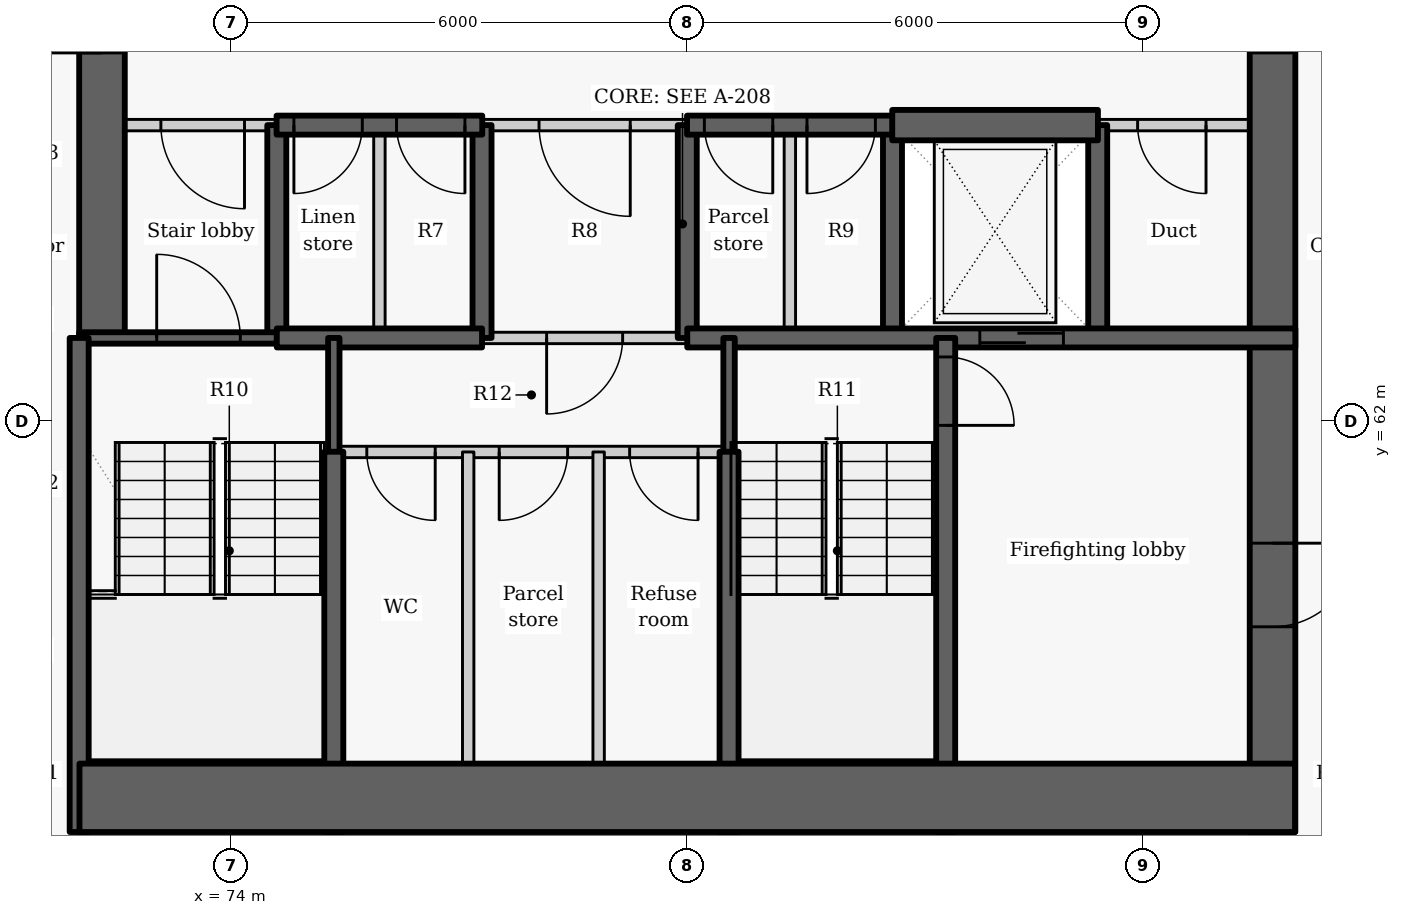
"""IFC4 building model, lengths in metres.
Left out: names, types, materials, properties, quantities, classifications, styles, units other than length and angle.
Written with IfcOpenShell. Run it as: python <this file> out.ifc"""

import sys

from ifc_helpers import new_model, si_unit, direction, frame, frame_2d, origin, place, context, subcontext, project, spatial, rectangle, extrude, element, fill, save


model = new_model("IFC4")
c1 = context("Model", 3, precision=1e-05, world=origin(), true_north=direction((0.0, 1.0)))
c2 = subcontext(c1, "Body", "Model", "MODEL_VIEW")
j1 = project(units=[si_unit("LENGTHUNIT", "METRE"), si_unit("PLANEANGLEUNIT", "RADIAN")], contexts=[c1])
p1 = place(None, origin())
s1 = spatial("IfcSite", under=j1, at=p1, CompositionType="ELEMENT")
p2 = place(p1, origin())
s2 = spatial("IfcBuilding", under=s1, at=p2, CompositionType="ELEMENT")
p3 = place(p2, frame((0.0, 0.0, 31.5)))
s3 = spatial("IfcBuildingStorey", under=s2, at=p3, CompositionType="ELEMENT", Elevation=31.5)
p4 = place(p3, frame((74.6, 63.1, -0.275), z_axis=(0.0, 0.0, 1.0), x_axis=(0.0, 1.0, 0.0)))
e1 = element("IfcWall", 1, at=p4, inside=s3, PredefinedType="SHEAR", context=c2, shape_type="SweptSolid", body=[
    extrude(rectangle(XDim=2.8, YDim=0.25, at=frame_2d((1.4, 0.0))), origin(), (0.0, 0.0, 1.0), 3.3),
])
p5 = place(p3, frame((72.3, 63.1, -0.275), z_axis=(0.0, 0.0, 1.0), x_axis=(0.0, 1.0, 0.0)))
e2 = element("IfcWall", 2, at=p5, inside=s3, PredefinedType="SHEAR", context=c2, shape_type="SweptSolid", body=[
    extrude(rectangle(XDim=9.1, YDim=0.6, at=frame_2d((4.55, 0.0))), origin(), (0.0, 0.0, 1.0), 3.3),
])
p6 = place(p5, frame((3.75, 0.0, 0.275)))
e3 = element("IfcOpeningElement", 3, at=p6, cuts=e2, PredefinedType="OPENING", context=c2, shape_type="SweptSolid", body=[
    extrude(rectangle(XDim=1.5, YDim=2.1, at=frame_2d((0.75, 1.05))), frame((0.0, 0.31, 0.0), z_axis=(0.0, -1.0, 0.0), x_axis=(1.0, 0.0, 0.0)), (0.0, 0.0, 1.0), 0.62),
])
for number, where, z_axis, x_axis in (
    (4, (77.3, 63.1, -0.275), (0.0, 0.0, 1.0), (0.0, 1.0, 0.0)),
    (5, (80.0, 63.1, -0.275), (0.0, 0.0, 1.0), (0.0, 1.0, 0.0)),
    (6, (82.7, 63.1, -0.275), (0.0, 0.0, 1.0), (0.0, 1.0, 0.0)),
    (7, (85.4, 63.1, -0.275), (0.0, 0.0, 1.0), (0.0, 1.0, 0.0)),
):
    element("IfcWall", number, at=place(p3, frame(where, z_axis=z_axis, x_axis=x_axis)), inside=s3, PredefinedType="SHEAR", context=c2, shape_type="SweptSolid", body=[
        extrude(rectangle(XDim=2.8, YDim=0.25, at=frame_2d((1.4, 0.0))), origin(), (0.0, 0.0, 1.0), 3.3),
    ])
p7 = place(p3, frame((87.7, 72.2, -0.275), z_axis=(0.0, 0.0, 1.0), x_axis=(0.0, -1.0, 0.0)))
e8 = element("IfcWall", 8, at=p7, inside=s3, PredefinedType="SHEAR", context=c2, shape_type="SweptSolid", body=[
    extrude(rectangle(XDim=15.6, YDim=0.6, at=frame_2d((7.8, 0.0))), origin(), (0.0, 0.0, 1.0), 3.3),
])
p8 = place(p7, frame((3.85, 0.0, 0.275)))
e9 = element("IfcOpeningElement", 9, at=p8, cuts=e8, PredefinedType="OPENING", context=c2, shape_type="SweptSolid", body=[
    extrude(rectangle(XDim=1.5, YDim=2.1, at=frame_2d((0.75, 1.05))), frame((0.0, 0.31, 0.0), z_axis=(0.0, -1.0, 0.0), x_axis=(1.0, 0.0, 0.0)), (0.0, 0.0, 1.0), 0.62),
])
p9 = place(p7, frame((11.8, 0.0, 0.275)))
e10 = element("IfcOpeningElement", 10, at=p9, cuts=e8, PredefinedType="OPENING", context=c2, shape_type="SweptSolid", body=[
    extrude(rectangle(XDim=1.1, YDim=2.1, at=frame_2d((0.55, 1.05))), frame((0.0, 0.31, 0.0), z_axis=(0.0, -1.0, 0.0), x_axis=(1.0, 0.0, 0.0)), (0.0, 0.0, 1.0), 0.62),
])
p10 = place(p3, frame((74.603, 65.9, 0.0), z_axis=(0.0, 0.0, 1.0), x_axis=(-1.0, 0.0, 0.0)))
e11 = element("IfcWall", 11, at=p10, inside=s3, PredefinedType="PARTITIONING", context=c2, shape_type="SweptSolid", body=[
    extrude(rectangle(XDim=2.603, YDim=0.15, at=frame_2d((1.302, 0.0))), origin(), (0.0, 0.0, 1.0), 3.025),
])
p11 = place(p10, frame((0.428, 0.0, 0.0)))
e12 = element("IfcOpeningElement", 12, at=p11, cuts=e11, PredefinedType="OPENING", context=c2, shape_type="SweptSolid", body=[
    extrude(rectangle(XDim=1.1, YDim=2.1, at=frame_2d((0.55, 1.05))), frame((0.0, 0.085, 0.0), z_axis=(0.0, -1.0, 0.0), x_axis=(1.0, 0.0, 0.0)), (0.0, 0.0, 1.0), 0.17),
])
p12 = place(p3, frame((80.003, 65.9, 0.0), z_axis=(0.0, 0.0, 1.0), x_axis=(-1.0, 0.0, 0.0)))
e13 = element("IfcWall", 13, at=p12, inside=s3, PredefinedType="PARTITIONING", context=c2, shape_type="SweptSolid", body=[
    extrude(rectangle(XDim=2.706, YDim=0.15, at=frame_2d((1.353, 0.0))), origin(), (0.0, 0.0, 1.0), 3.025),
])
p13 = place(p12, frame((0.753, 0.0, 0.0)))
e14 = element("IfcOpeningElement", 14, at=p13, cuts=e13, PredefinedType="OPENING", context=c2, shape_type="SweptSolid", body=[
    extrude(rectangle(XDim=1.2, YDim=2.1, at=frame_2d((0.6, 1.05))), frame((0.0, 0.085, 0.0), z_axis=(0.0, -1.0, 0.0), x_axis=(1.0, 0.0, 0.0)), (0.0, 0.0, 1.0), 0.17),
])
p14 = place(p3, frame((88.0, 65.9, 0.0), z_axis=(0.0, 0.0, 1.0), x_axis=(-1.0, 0.0, 0.0)))
e15 = element("IfcWall", 15, at=p14, inside=s3, PredefinedType="PARTITIONING", context=c2, shape_type="SweptSolid", body=[
    extrude(rectangle(XDim=2.603, YDim=0.15, at=frame_2d((1.302, 0.0))), origin(), (0.0, 0.0, 1.0), 3.025),
])
p15 = place(p14, frame((1.175, 0.0, 0.0)))
e16 = element("IfcOpeningElement", 16, at=p15, cuts=e15, PredefinedType="OPENING", context=c2, shape_type="SweptSolid", body=[
    extrude(rectangle(XDim=0.9, YDim=2.1, at=frame_2d((0.45, 1.05))), frame((0.0, 0.085, 0.0), z_axis=(0.0, -1.0, 0.0), x_axis=(1.0, 0.0, 0.0)), (0.0, 0.0, 1.0), 0.17),
])
p16 = place(p3, frame((77.303, 65.9, -0.275), z_axis=(0.0, 0.0, 1.0), x_axis=(-1.0, 0.0, 0.0)))
e17 = element("IfcWall", 17, at=p16, inside=s3, PredefinedType="SHEAR", context=c2, shape_type="SweptSolid", body=[
    extrude(rectangle(XDim=2.706, YDim=0.25, at=frame_2d((1.353, 0.0))), origin(), (0.0, 0.0, 1.0), 3.3),
])
p17 = place(p16, frame((1.578, 0.0, 0.275)))
e18 = element("IfcOpeningElement", 18, at=p17, cuts=e17, PredefinedType="OPENING", context=c2, shape_type="SweptSolid", body=[
    extrude(rectangle(XDim=0.9, YDim=2.1, at=frame_2d((0.45, 1.05))), frame((0.0, 0.135, 0.0), z_axis=(0.0, -1.0, 0.0), x_axis=(1.0, 0.0, 0.0)), (0.0, 0.0, 1.0), 0.27),
])
p18 = place(p16, frame((0.228, 0.0, 0.275)))
e19 = element("IfcOpeningElement", 19, at=p18, cuts=e17, PredefinedType="OPENING", context=c2, shape_type="SweptSolid", body=[
    extrude(rectangle(XDim=0.9, YDim=2.1, at=frame_2d((0.45, 1.05))), frame((0.0, 0.135, 0.0), z_axis=(0.0, -1.0, 0.0), x_axis=(1.0, 0.0, 0.0)), (0.0, 0.0, 1.0), 0.27),
])
p19 = place(p3, frame((82.703, 65.9, -0.275), z_axis=(0.0, 0.0, 1.0), x_axis=(-1.0, 0.0, 0.0)))
e20 = element("IfcWall", 20, at=p19, inside=s3, PredefinedType="SHEAR", context=c2, shape_type="SweptSolid", body=[
    extrude(rectangle(XDim=2.706, YDim=0.25, at=frame_2d((1.353, 0.0))), origin(), (0.0, 0.0, 1.0), 3.3),
])
p20 = place(p19, frame((1.578, 0.0, 0.275)))
e21 = element("IfcOpeningElement", 21, at=p20, cuts=e20, PredefinedType="OPENING", context=c2, shape_type="SweptSolid", body=[
    extrude(rectangle(XDim=0.9, YDim=2.1, at=frame_2d((0.45, 1.05))), frame((0.0, 0.135, 0.0), z_axis=(0.0, -1.0, 0.0), x_axis=(1.0, 0.0, 0.0)), (0.0, 0.0, 1.0), 0.27),
])
p21 = place(p19, frame((0.228, 0.0, 0.275)))
e22 = element("IfcOpeningElement", 22, at=p21, cuts=e20, PredefinedType="OPENING", context=c2, shape_type="SweptSolid", body=[
    extrude(rectangle(XDim=0.9, YDim=2.1, at=frame_2d((0.45, 1.05))), frame((0.0, 0.135, 0.0), z_axis=(0.0, -1.0, 0.0), x_axis=(1.0, 0.0, 0.0)), (0.0, 0.0, 1.0), 0.27),
])
p22 = place(p3, frame((82.697, 65.9, -0.275), z_axis=(0.0, 0.0, 1.0), x_axis=(1.0, 0.0, 0.0)))
e23 = element("IfcWall", 23, at=p22, inside=s3, PredefinedType="SHEAR", context=c2, shape_type="SweptSolid", body=[
    extrude(rectangle(XDim=2.706, YDim=0.4, at=frame_2d((1.353, 0.0))), origin(), (0.0, 0.0, 1.0), 3.3),
])
p23 = place(p3, frame((72.0, 63.1, -0.275), z_axis=(0.0, 0.0, 1.0), x_axis=(1.0, 0.0, 0.0)))
e24 = element("IfcWall", 24, at=p23, inside=s3, PredefinedType="SHEAR", context=c2, shape_type="SweptSolid", body=[
    extrude(rectangle(XDim=2.6, YDim=0.15, at=frame_2d((1.3, 0.0))), origin(), (0.0, 0.0, 1.0), 3.3),
])
p24 = place(p23, frame((1.02, 0.0, 0.275)))
e25 = element("IfcOpeningElement", 25, at=p24, cuts=e24, PredefinedType="OPENING", context=c2, shape_type="SweptSolid", body=[
    extrude(rectangle(XDim=1.1, YDim=2.1, at=frame_2d((0.55, 1.05))), frame((0.0, 0.085, 0.0), z_axis=(0.0, -1.0, 0.0), x_axis=(1.0, 0.0, 0.0)), (0.0, 0.0, 1.0), 0.17),
])
p25 = place(p3, frame((75.95, 63.1, 0.0), z_axis=(0.0, 0.0, 1.0), x_axis=(0.0, 1.0, 0.0)))
e26 = element("IfcWall", 26, at=p25, inside=s3, PredefinedType="PARTITIONING", context=c2, shape_type="SweptSolid", body=[
    extrude(rectangle(XDim=2.8, YDim=0.15, at=frame_2d((1.4, 0.0))), origin(), (0.0, 0.0, 1.0), 3.025),
])
p26 = place(p3, frame((74.6, 63.1, -0.275), z_axis=(0.0, 0.0, 1.0), x_axis=(1.0, 0.0, 0.0)))
e27 = element("IfcWall", 27, at=p26, inside=s3, PredefinedType="SHEAR", context=c2, shape_type="SweptSolid", body=[
    extrude(rectangle(XDim=2.7, YDim=0.25, at=frame_2d((1.35, 0.0))), origin(), (0.0, 0.0, 1.0), 3.3),
])
p27 = place(p3, frame((80.0, 63.1, -0.275), z_axis=(0.0, 0.0, 1.0), x_axis=(1.0, 0.0, 0.0)))
e28 = element("IfcWall", 28, at=p27, inside=s3, PredefinedType="SHEAR", context=c2, shape_type="SweptSolid", body=[
    extrude(rectangle(XDim=8.0, YDim=0.25, at=frame_2d((4.0, 0.0))), origin(), (0.0, 0.0, 1.0), 3.3),
])
p28 = place(p27, frame((3.849, 0.0, 0.275)))
e29 = element("IfcOpeningElement", 29, at=p28, cuts=e28, PredefinedType="OPENING", context=c2, shape_type="SweptSolid", body=[
    extrude(rectangle(XDim=1.1, YDim=2.1, at=frame_2d((0.55, 1.05))), frame((0.0, 0.135, 0.0), z_axis=(0.0, -1.0, 0.0), x_axis=(1.0, 0.0, 0.0)), (0.0, 0.0, 1.0), 0.27),
])
p29 = place(p3, frame((80.0, 63.1, 0.0), z_axis=(0.0, 0.0, 1.0), x_axis=(-1.0, 0.0, 0.0)))
e30 = element("IfcWall", 30, at=p29, inside=s3, PredefinedType="PARTITIONING", context=c2, shape_type="SweptSolid", body=[
    extrude(rectangle(XDim=2.7, YDim=0.15, at=frame_2d((1.35, 0.0))), origin(), (0.0, 0.0, 1.0), 3.025),
])
p30 = place(p29, frame((0.85, 0.0, 0.0)))
e31 = element("IfcOpeningElement", 31, at=p30, cuts=e30, PredefinedType="OPENING", context=c2, shape_type="SweptSolid", body=[
    extrude(rectangle(XDim=1.0, YDim=2.1, at=frame_2d((0.5, 1.05))), frame((0.0, 0.085, 0.0), z_axis=(0.0, -1.0, 0.0), x_axis=(1.0, 0.0, 0.0)), (0.0, 0.0, 1.0), 0.17),
])
p31 = place(p3, frame((81.35, 63.1, 0.0), z_axis=(0.0, 0.0, 1.0), x_axis=(0.0, 1.0, 0.0)))
e32 = element("IfcWall", 32, at=p31, inside=s3, PredefinedType="PARTITIONING", context=c2, shape_type="SweptSolid", body=[
    extrude(rectangle(XDim=2.8, YDim=0.15, at=frame_2d((1.4, 0.0))), origin(), (0.0, 0.0, 1.0), 3.025),
])
p32 = place(p3, frame((75.35, 61.597, -0.275), z_axis=(0.0, 0.0, 1.0), x_axis=(0.0, 1.0, 0.0)))
e33 = element("IfcWall", 33, at=p32, inside=s3, PredefinedType="SHEAR", context=c2, shape_type="SweptSolid", body=[
    extrude(rectangle(XDim=1.503, YDim=0.15, at=frame_2d((0.751, 0.0))), origin(), (0.0, 0.0, 1.0), 3.3),
])
p33 = place(p3, frame((75.35, 56.6, -0.275), z_axis=(0.0, 0.0, 1.0), x_axis=(0.0, 1.0, 0.0)))
e34 = element("IfcWall", 34, at=p33, inside=s3, PredefinedType="SHEAR", context=c2, shape_type="SweptSolid", body=[
    extrude(rectangle(XDim=5.003, YDim=0.25, at=frame_2d((2.501, 0.0))), origin(), (0.0, 0.0, 1.0), 3.3),
])
p34 = place(p3, frame((72.0, 56.6, -0.275), z_axis=(0.0, 0.0, 1.0), x_axis=(0.0, 1.0, 0.0)))
e35 = element("IfcWall", 35, at=p34, inside=s3, PredefinedType="SHEAR", context=c2, shape_type="SweptSolid", body=[
    extrude(rectangle(XDim=6.5, YDim=0.25, at=frame_2d((3.25, 0.0))), origin(), (0.0, 0.0, 1.0), 3.3),
])
p35 = place(p3, frame((83.4, 63.1, -0.275), z_axis=(0.0, 0.0, 1.0), x_axis=(0.0, -1.0, 0.0)))
e36 = element("IfcWall", 36, at=p35, inside=s3, PredefinedType="SHEAR", context=c2, shape_type="SweptSolid", body=[
    extrude(rectangle(XDim=6.5, YDim=0.25, at=frame_2d((3.25, 0.0))), origin(), (0.0, 0.0, 1.0), 3.3),
])
p36 = place(p35, frame((0.25, 0.0, 0.275)))
e37 = element("IfcOpeningElement", 37, at=p36, cuts=e36, PredefinedType="OPENING", context=c2, shape_type="SweptSolid", body=[
    extrude(rectangle(XDim=0.9, YDim=2.1, at=frame_2d((0.45, 1.05))), frame((0.0, 0.135, 0.0), z_axis=(0.0, -1.0, 0.0), x_axis=(1.0, 0.0, 0.0)), (0.0, 0.0, 1.0), 0.27),
])
p37 = place(p3, frame((80.55, 61.597, -0.275), z_axis=(0.0, 0.0, 1.0), x_axis=(0.0, 1.0, 0.0)))
e38 = element("IfcWall", 38, at=p37, inside=s3, PredefinedType="SHEAR", context=c2, shape_type="SweptSolid", body=[
    extrude(rectangle(XDim=1.503, YDim=0.15, at=frame_2d((0.751, 0.0))), origin(), (0.0, 0.0, 1.0), 3.3),
])
p38 = place(p3, frame((80.55, 56.6, -0.275), z_axis=(0.0, 0.0, 1.0), x_axis=(0.0, 1.0, 0.0)))
e39 = element("IfcWall", 39, at=p38, inside=s3, PredefinedType="SHEAR", context=c2, shape_type="SweptSolid", body=[
    extrude(rectangle(XDim=5.003, YDim=0.25, at=frame_2d((2.501, 0.0))), origin(), (0.0, 0.0, 1.0), 3.3),
])
p39 = place(p3, frame((80.55, 61.6, 0.0), z_axis=(0.0, 0.0, 1.0), x_axis=(-1.0, 0.0, 0.0)))
e40 = element("IfcWall", 40, at=p39, inside=s3, PredefinedType="PARTITIONING", context=c2, shape_type="SweptSolid", body=[
    extrude(rectangle(XDim=5.2, YDim=0.15, at=frame_2d((2.6, 0.0))), origin(), (0.0, 0.0, 1.0), 3.025),
])
p40 = place(p39, frame((3.866, 0.0, 0.0)))
e41 = element("IfcOpeningElement", 41, at=p40, cuts=e40, PredefinedType="OPENING", context=c2, shape_type="SweptSolid", body=[
    extrude(rectangle(XDim=0.9, YDim=2.1, at=frame_2d((0.45, 1.05))), frame((0.0, 0.085, 0.0), z_axis=(0.0, -1.0, 0.0), x_axis=(1.0, 0.0, 0.0)), (0.0, 0.0, 1.0), 0.17),
])
p41 = place(p39, frame((2.124, 0.0, 0.0)))
e42 = element("IfcOpeningElement", 42, at=p41, cuts=e40, PredefinedType="OPENING", context=c2, shape_type="SweptSolid", body=[
    extrude(rectangle(XDim=0.9, YDim=2.1, at=frame_2d((0.45, 1.05))), frame((0.0, 0.085, 0.0), z_axis=(0.0, -1.0, 0.0), x_axis=(1.0, 0.0, 0.0)), (0.0, 0.0, 1.0), 0.17),
])
p42 = place(p39, frame((0.408, 0.0, 0.0)))
e43 = element("IfcOpeningElement", 43, at=p42, cuts=e40, PredefinedType="OPENING", context=c2, shape_type="SweptSolid", body=[
    extrude(rectangle(XDim=0.9, YDim=2.1, at=frame_2d((0.45, 1.05))), frame((0.0, 0.085, 0.0), z_axis=(0.0, -1.0, 0.0), x_axis=(1.0, 0.0, 0.0)), (0.0, 0.0, 1.0), 0.17),
])
for number, where, z_axis, x_axis in (
    (44, (77.118, 56.6, 0.0), (0.0, 0.0, 1.0), (0.0, 1.0, 0.0)),
    (45, (78.834, 56.6, 0.0), (0.0, 0.0, 1.0), (0.0, 1.0, 0.0)),
):
    element("IfcWall", number, at=place(p3, frame(where, z_axis=z_axis, x_axis=x_axis)), inside=s3, PredefinedType="PARTITIONING", context=c2, shape_type="SweptSolid", body=[
        extrude(rectangle(XDim=5.0, YDim=0.15, at=frame_2d((2.5, 0.0))), origin(), (0.0, 0.0, 1.0), 3.025),
    ])
p43 = place(p3, frame((72.004, 57.05, -0.275), z_axis=(0.0, 0.0, 1.0), x_axis=(1.0, 0.0, 0.0)))
e46 = element("IfcWall", 46, at=p43, inside=s3, PredefinedType="SHEAR", context=c2, shape_type="SweptSolid", body=[
    extrude(rectangle(XDim=15.992, YDim=0.9, at=frame_2d((7.996, 0.0))), origin(), (0.0, 0.0, 1.0), 3.3),
])
p44 = place(p11, origin())
e47 = element("IfcDoor", 47, at=p44, inside=s3, OperationType="SINGLE_SWING_LEFT", PredefinedType="DOOR", context=c2, shape_type="SweptSolid", body=[
    extrude(rectangle(XDim=1.1, YDim=2.1, at=frame_2d((0.55, 1.05))), frame((0.0, 0.025, 0.0), z_axis=(0.0, -1.0, 0.0), x_axis=(1.0, 0.0, 0.0)), (0.0, 0.0, 1.0), 0.05),
])
fill(e12, e47)
p45 = place(p17, origin())
e48 = element("IfcDoor", 48, at=p45, inside=s3, OperationType="SINGLE_SWING_RIGHT", PredefinedType="DOOR", context=c2, shape_type="SweptSolid", body=[
    extrude(rectangle(XDim=0.9, YDim=2.1, at=frame_2d((0.45, 1.05))), frame((0.0, 0.025, 0.0), z_axis=(0.0, -1.0, 0.0), x_axis=(1.0, 0.0, 0.0)), (0.0, 0.0, 1.0), 0.05),
])
fill(e18, e48)
p46 = place(p18, origin())
e49 = element("IfcDoor", 49, at=p46, inside=s3, OperationType="SINGLE_SWING_LEFT", PredefinedType="DOOR", context=c2, shape_type="SweptSolid", body=[
    extrude(rectangle(XDim=0.9, YDim=2.1, at=frame_2d((0.45, 1.05))), frame((0.0, 0.025, 0.0), z_axis=(0.0, -1.0, 0.0), x_axis=(1.0, 0.0, 0.0)), (0.0, 0.0, 1.0), 0.05),
])
fill(e19, e49)
p47 = place(p13, origin())
e50 = element("IfcDoor", 50, at=p47, inside=s3, OperationType="DOUBLE_DOOR_SINGLE_SWING", PredefinedType="DOOR", context=c2, shape_type="SweptSolid", body=[
    extrude(rectangle(XDim=1.2, YDim=2.1, at=frame_2d((0.6, 1.05))), frame((0.0, 0.025, 0.0), z_axis=(0.0, -1.0, 0.0), x_axis=(1.0, 0.0, 0.0)), (0.0, 0.0, 1.0), 0.05),
])
fill(e14, e50)
p48 = place(p20, origin())
e51 = element("IfcDoor", 51, at=p48, inside=s3, OperationType="SINGLE_SWING_LEFT", PredefinedType="DOOR", context=c2, shape_type="SweptSolid", body=[
    extrude(rectangle(XDim=0.9, YDim=2.1, at=frame_2d((0.45, 1.05))), frame((0.0, 0.025, 0.0), z_axis=(0.0, -1.0, 0.0), x_axis=(1.0, 0.0, 0.0)), (0.0, 0.0, 1.0), 0.05),
])
fill(e21, e51)
p49 = place(p21, origin())
e52 = element("IfcDoor", 52, at=p49, inside=s3, OperationType="SINGLE_SWING_RIGHT", PredefinedType="DOOR", context=c2, shape_type="SweptSolid", body=[
    extrude(rectangle(XDim=0.9, YDim=2.1, at=frame_2d((0.45, 1.05))), frame((0.0, 0.025, 0.0), z_axis=(0.0, -1.0, 0.0), x_axis=(1.0, 0.0, 0.0)), (0.0, 0.0, 1.0), 0.05),
])
fill(e22, e52)
p50 = place(p28, origin())
e53 = element("IfcDoor", 53, at=p50, inside=s3, OperationType="SLIDING_TO_LEFT", PredefinedType="DOOR", context=c2, shape_type="SweptSolid", body=[
    extrude(rectangle(XDim=1.1, YDim=2.1, at=frame_2d((0.55, 1.05))), frame((0.0, 0.025, 0.0), z_axis=(0.0, -1.0, 0.0), x_axis=(1.0, 0.0, 0.0)), (0.0, 0.0, 1.0), 0.05),
])
fill(e29, e53)
p51 = place(p15, origin())
e54 = element("IfcDoor", 54, at=p51, inside=s3, OperationType="SINGLE_SWING_LEFT", PredefinedType="DOOR", context=c2, shape_type="SweptSolid", body=[
    extrude(rectangle(XDim=0.9, YDim=2.1, at=frame_2d((0.45, 1.05))), frame((0.0, 0.025, 0.0), z_axis=(0.0, -1.0, 0.0), x_axis=(1.0, 0.0, 0.0)), (0.0, 0.0, 1.0), 0.05),
])
fill(e16, e54)
p52 = place(p30, origin())
e55 = element("IfcDoor", 55, at=p52, inside=s3, OperationType="SINGLE_SWING_RIGHT", PredefinedType="DOOR", context=c2, shape_type="SweptSolid", body=[
    extrude(rectangle(XDim=1.0, YDim=2.1, at=frame_2d((0.5, 1.05))), frame((0.0, 0.025, 0.0), z_axis=(0.0, -1.0, 0.0), x_axis=(1.0, 0.0, 0.0)), (0.0, 0.0, 1.0), 0.05),
])
fill(e31, e55)
p53 = place(p40, origin())
e56 = element("IfcDoor", 56, at=p53, inside=s3, OperationType="SINGLE_SWING_LEFT", PredefinedType="DOOR", context=c2, shape_type="SweptSolid", body=[
    extrude(rectangle(XDim=0.9, YDim=2.1, at=frame_2d((0.45, 1.05))), frame((0.0, 0.025, 0.0), z_axis=(0.0, -1.0, 0.0), x_axis=(1.0, 0.0, 0.0)), (0.0, 0.0, 1.0), 0.05),
])
fill(e41, e56)
p54 = place(p41, origin())
e57 = element("IfcDoor", 57, at=p54, inside=s3, OperationType="SINGLE_SWING_RIGHT", PredefinedType="DOOR", context=c2, shape_type="SweptSolid", body=[
    extrude(rectangle(XDim=0.9, YDim=2.1, at=frame_2d((0.45, 1.05))), frame((0.0, 0.025, 0.0), z_axis=(0.0, -1.0, 0.0), x_axis=(1.0, 0.0, 0.0)), (0.0, 0.0, 1.0), 0.05),
])
fill(e42, e57)
p55 = place(p42, origin())
e58 = element("IfcDoor", 58, at=p55, inside=s3, OperationType="SINGLE_SWING_LEFT", PredefinedType="DOOR", context=c2, shape_type="SweptSolid", body=[
    extrude(rectangle(XDim=0.9, YDim=2.1, at=frame_2d((0.45, 1.05))), frame((0.0, 0.025, 0.0), z_axis=(0.0, -1.0, 0.0), x_axis=(1.0, 0.0, 0.0)), (0.0, 0.0, 1.0), 0.05),
])
fill(e43, e58)
p56 = place(p24, origin())
e59 = element("IfcDoor", 59, at=p56, inside=s3, OperationType="SINGLE_SWING_LEFT", PredefinedType="DOOR", context=c2, shape_type="SweptSolid", body=[
    extrude(rectangle(XDim=1.1, YDim=2.1, at=frame_2d((0.55, 1.05))), frame((0.0, 0.025, 0.0), z_axis=(0.0, -1.0, 0.0), x_axis=(1.0, 0.0, 0.0)), (0.0, 0.0, 1.0), 0.05),
])
fill(e25, e59)
p57 = place(p36, origin())
e60 = element("IfcDoor", 60, at=p57, inside=s3, OperationType="SINGLE_SWING_RIGHT", PredefinedType="DOOR", context=c2, shape_type="SweptSolid", body=[
    extrude(rectangle(XDim=0.9, YDim=2.1, at=frame_2d((0.45, 1.05))), frame((0.0, 0.025, 0.0), z_axis=(0.0, -1.0, 0.0), x_axis=(1.0, 0.0, 0.0)), (0.0, 0.0, 1.0), 0.05),
])
fill(e37, e60)
p58 = place(p8, origin())
e61 = element("IfcDoor", 61, at=p58, inside=s3, OperationType="DOUBLE_DOOR_SINGLE_SWING", PredefinedType="DOOR", context=c2, shape_type="SweptSolid", body=[
    extrude(rectangle(XDim=1.5, YDim=2.1, at=frame_2d((0.75, 1.05))), frame((0.0, 0.025, 0.0), z_axis=(0.0, -1.0, 0.0), x_axis=(1.0, 0.0, 0.0)), (0.0, 0.0, 1.0), 0.05),
])
fill(e9, e61)
p59 = place(p9, origin())
e62 = element("IfcDoor", 62, at=p59, inside=s3, OperationType="SINGLE_SWING_LEFT", PredefinedType="DOOR", context=c2, shape_type="SweptSolid", body=[
    extrude(rectangle(XDim=1.1, YDim=2.1, at=frame_2d((0.55, 1.05))), frame((0.0, 0.025, 0.0), z_axis=(0.0, -1.0, 0.0), x_axis=(1.0, 0.0, 0.0)), (0.0, 0.0, 1.0), 0.05),
])
fill(e10, e62)
save(model, sys.argv[1])
